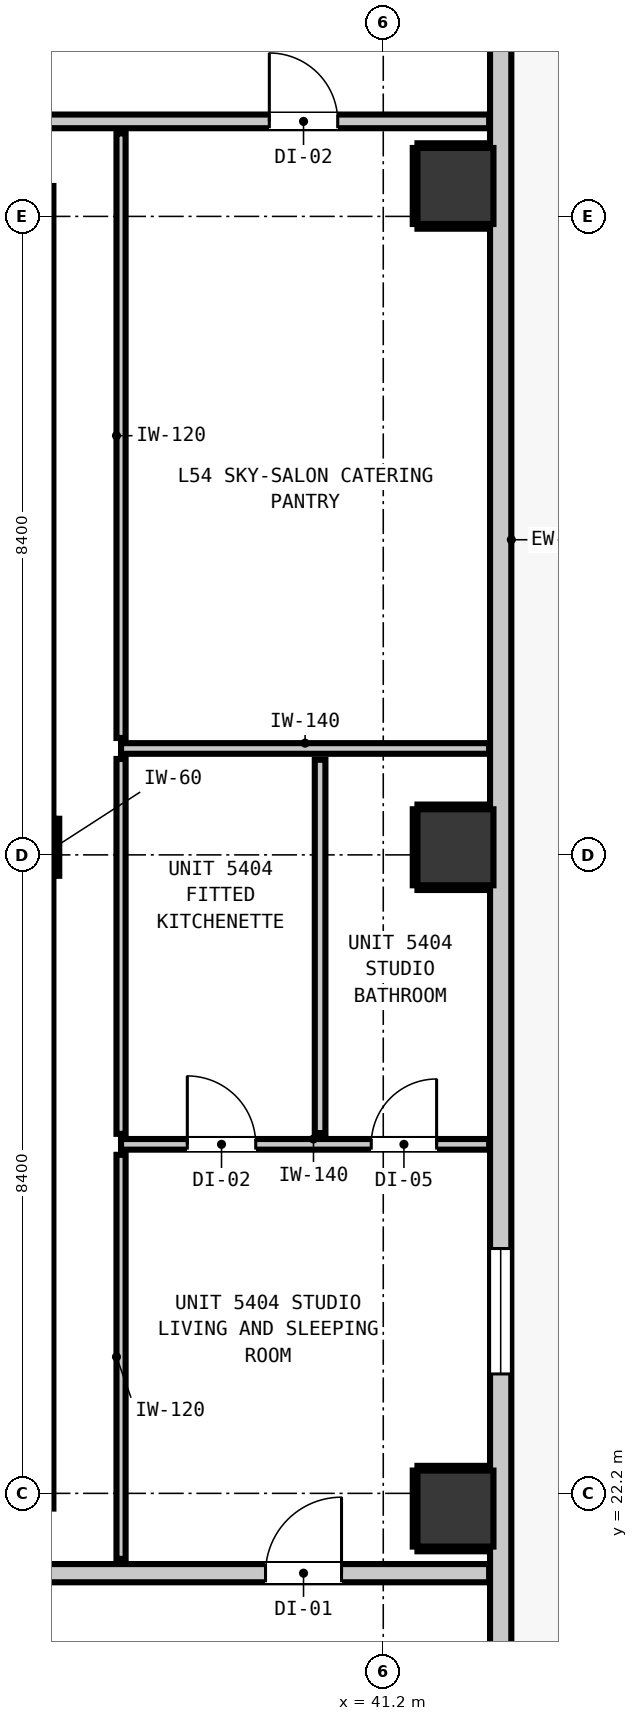
"""IFC4 building model, lengths in metres.
Left out: names, types, materials, properties, quantities, classifications, styles, units other than length and angle.
Written with IfcOpenShell. Run it as: python <this file> out.ifc"""

import sys

from ifc_helpers import new_model, si_unit, direction, frame, frame_2d, origin, origin_2d, place, context, subcontext, project, spatial, rectangle, extrude, element, fill, save


model = new_model("IFC4")
c1 = context("Model", 3, precision=1e-05, world=origin(), true_north=direction((0.0, 1.0)))
c2 = subcontext(c1, "Body", "Model", "MODEL_VIEW")
j1 = project(units=[si_unit("LENGTHUNIT", "METRE"), si_unit("PLANEANGLEUNIT", "RADIAN")], contexts=[c1])
p1 = place(None, origin())
s1 = spatial("IfcSite", under=j1, at=p1, CompositionType="ELEMENT")
p2 = place(p1, origin())
s2 = spatial("IfcBuilding", under=s1, at=p2, CompositionType="ELEMENT")
p3 = place(p2, frame((0.0, 0.0, 186.84)))
s3 = spatial("IfcBuildingStorey", under=s2, at=p3, CompositionType="ELEMENT", Elevation=186.84)
p4 = place(p3, frame((36.5, 30.7, 0.0), z_axis=(0.0, 0.0, 1.0), x_axis=(1.0, 0.0, 0.0)))
e1 = element("IfcColumn", 1, at=p4, inside=s3, PredefinedType="COLUMN", context=c2, shape_type="SweptSolid", body=[
    extrude(rectangle(XDim=0.75, YDim=0.75, at=origin_2d()), origin(), (0.0, 0.0, 1.0), 3.32),
])
p5 = place(p3, frame((36.46, 22.0, 0.0), z_axis=(0.0, 0.0, 1.0), x_axis=(0.0, 1.0, 0.0)))
e2 = element("IfcWall", 2, at=p5, inside=s3, PredefinedType="SHEAR", context=c2, shape_type="SweptSolid", body=[
    extrude(rectangle(XDim=8.32, YDim=0.8, at=frame_2d((4.16, 0.0))), origin(), (0.0, 0.0, 1.0), 3.32),
])
p6 = place(p3, frame((36.46, 31.08, 0.0), z_axis=(0.0, 0.0, 1.0), x_axis=(0.0, 1.0, 0.0)))
e3 = element("IfcWall", 3, at=p6, inside=s3, PredefinedType="SHEAR", context=c2, shape_type="SweptSolid", body=[
    extrude(rectangle(XDim=8.32, YDim=0.8, at=frame_2d((4.16, 0.0))), origin(), (0.0, 0.0, 1.0), 3.32),
])
for number, where, z_axis, x_axis in (
    (4, (42.15, 22.0, 0.0), (0.0, 0.0, 1.0), (1.0, 0.0, 0.0)),
    (5, (42.15, 30.7, 0.0), (0.0, 0.0, 1.0), (1.0, 0.0, 0.0)),
    (6, (42.15, 39.4, 0.0), (0.0, 0.0, 1.0), (1.0, 0.0, 0.0)),
):
    element("IfcColumn", number, at=place(p3, frame(where, z_axis=z_axis, x_axis=x_axis)), inside=s3, PredefinedType="COLUMN", context=c2, shape_type="SweptSolid", body=[
        extrude(rectangle(XDim=1.0, YDim=1.0, at=origin_2d()), origin(), (0.0, 0.0, 1.0), 2.9),
    ])
p7 = place(p3, frame((42.745, 49.845, 0.0), z_axis=(0.0, 0.0, 1.0), x_axis=(0.0, -1.0, 0.0)))
e7 = element("IfcWall", 7, at=p7, inside=s3, PredefinedType="STANDARD", context=c2, shape_type="SweptSolid", body=[
    extrude(rectangle(XDim=32.29, YDim=0.28, at=frame_2d((16.145, 0.0))), origin(), (0.0, 0.0, 1.0), 2.9),
])
p8 = place(p7, frame((0.904, 0.0, 0.0)))
e8 = element("IfcOpeningElement", 8, at=p8, cuts=e7, PredefinedType="OPENING", context=c2, shape_type="SweptSolid", body=[
    extrude(rectangle(XDim=1.0, YDim=2.15, at=frame_2d((0.5, 1.075))), frame((0.0, 0.15, 0.0), z_axis=(0.0, -1.0, 0.0), x_axis=(1.0, 0.0, 0.0)), (0.0, 0.0, 1.0), 0.3),
])
p9 = place(p7, frame((30.822, 0.0, 0.85)))
e9 = element("IfcOpeningElement", 9, at=p9, cuts=e7, PredefinedType="OPENING", context=c2, shape_type="SweptSolid", body=[
    extrude(rectangle(XDim=1.05, YDim=1.65, at=frame_2d((0.525, 0.825))), frame((0.0, 0.15, 0.0), z_axis=(0.0, -1.0, 0.0), x_axis=(1.0, 0.0, 0.0)), (0.0, 0.0, 1.0), 0.3),
])
p10 = place(p7, frame((4.124, 0.0, 0.85)))
e10 = element("IfcOpeningElement", 10, at=p10, cuts=e7, PredefinedType="OPENING", context=c2, shape_type="SweptSolid", body=[
    extrude(rectangle(XDim=1.65, YDim=1.75, at=frame_2d((0.825, 0.875))), frame((0.0, 0.15, 0.0), z_axis=(0.0, -1.0, 0.0), x_axis=(1.0, 0.0, 0.0)), (0.0, 0.0, 1.0), 0.3),
])
p11 = place(p7, frame((24.424, 0.0, 0.85)))
e11 = element("IfcOpeningElement", 11, at=p11, cuts=e7, PredefinedType="OPENING", context=c2, shape_type="SweptSolid", body=[
    extrude(rectangle(XDim=1.65, YDim=1.75, at=frame_2d((0.825, 0.875))), frame((0.0, 0.15, 0.0), z_axis=(0.0, -1.0, 0.0), x_axis=(1.0, 0.0, 0.0)), (0.0, 0.0, 1.0), 0.3),
])
p12 = place(p3, frame((3.207, 21.15, 0.0), z_axis=(0.0, 0.0, 1.0), x_axis=(1.0, 0.0, 0.0)))
e12 = element("IfcWall", 12, at=p12, inside=s3, PredefinedType="PARTITIONING", context=c2, shape_type="SweptSolid", body=[
    extrude(rectangle(XDim=39.386, YDim=0.24, at=frame_2d((19.693, 0.0))), origin(), (0.0, 0.0, 1.0), 2.9),
])
p13 = place(p12, frame((15.003, 0.0, 0.0)))
e13 = element("IfcOpeningElement", 13, at=p13, cuts=e12, PredefinedType="OPENING", context=c2, shape_type="SweptSolid", body=[
    extrude(rectangle(XDim=1.1, YDim=2.15, at=frame_2d((0.55, 1.075))), frame((0.0, 0.13, 0.0), z_axis=(0.0, -1.0, 0.0), x_axis=(1.0, 0.0, 0.0)), (0.0, 0.0, 1.0), 0.26),
])
p14 = place(p12, frame((4.042, 0.0, 0.0)))
e14 = element("IfcOpeningElement", 14, at=p14, cuts=e12, PredefinedType="OPENING", context=c2, shape_type="SweptSolid", body=[
    extrude(rectangle(XDim=0.9, YDim=2.1, at=frame_2d((0.45, 1.05))), frame((0.0, 0.13, 0.0), z_axis=(0.0, -1.0, 0.0), x_axis=(1.0, 0.0, 0.0)), (0.0, 0.0, 1.0), 0.26),
])
p15 = place(p12, frame((36.444, 0.0, 0.0)))
e15 = element("IfcOpeningElement", 15, at=p15, cuts=e12, PredefinedType="OPENING", context=c2, shape_type="SweptSolid", body=[
    extrude(rectangle(XDim=1.0, YDim=2.15, at=frame_2d((0.5, 1.075))), frame((0.0, 0.13, 0.0), z_axis=(0.0, -1.0, 0.0), x_axis=(1.0, 0.0, 0.0)), (0.0, 0.0, 1.0), 0.26),
])
p16 = place(p3, frame((3.207, 40.25, 0.0), z_axis=(0.0, 0.0, 1.0), x_axis=(1.0, 0.0, 0.0)))
e16 = element("IfcWall", 16, at=p16, inside=s3, PredefinedType="PARTITIONING", context=c2, shape_type="SweptSolid", body=[
    extrude(rectangle(XDim=39.386, YDim=0.18, at=frame_2d((19.693, 0.0))), origin(), (0.0, 0.0, 1.0), 2.9),
])
p17 = place(p16, frame((14.228, 0.0, 0.0)))
e17 = element("IfcOpeningElement", 17, at=p17, cuts=e16, PredefinedType="OPENING", context=c2, shape_type="SweptSolid", body=[
    extrude(rectangle(XDim=1.4, YDim=2.15, at=frame_2d((0.7, 1.075))), frame((0.0, 0.1, 0.0), z_axis=(0.0, -1.0, 0.0), x_axis=(1.0, 0.0, 0.0)), (0.0, 0.0, 1.0), 0.2),
])
p18 = place(p16, frame((1.267, 0.0, 0.0)))
e18 = element("IfcOpeningElement", 18, at=p18, cuts=e16, PredefinedType="OPENING", context=c2, shape_type="SweptSolid", body=[
    extrude(rectangle(XDim=0.9, YDim=2.1, at=frame_2d((0.45, 1.05))), frame((0.0, 0.1, 0.0), z_axis=(0.0, -1.0, 0.0), x_axis=(1.0, 0.0, 0.0)), (0.0, 0.0, 1.0), 0.2),
])
p19 = place(p16, frame((5.694, 0.0, 0.0)))
e19 = element("IfcOpeningElement", 19, at=p19, cuts=e16, PredefinedType="OPENING", context=c2, shape_type="SweptSolid", body=[
    extrude(rectangle(XDim=0.95, YDim=2.1, at=frame_2d((0.475, 1.05))), frame((0.0, 0.1, 0.0), z_axis=(0.0, -1.0, 0.0), x_axis=(1.0, 0.0, 0.0)), (0.0, 0.0, 1.0), 0.2),
])
p20 = place(p16, frame((36.494, 0.0, 0.0)))
e20 = element("IfcOpeningElement", 20, at=p20, cuts=e16, PredefinedType="OPENING", context=c2, shape_type="SweptSolid", body=[
    extrude(rectangle(XDim=0.9, YDim=2.1, at=frame_2d((0.45, 1.05))), frame((0.0, 0.1, 0.0), z_axis=(0.0, -1.0, 0.0), x_axis=(1.0, 0.0, 0.0)), (0.0, 0.0, 1.0), 0.2),
])
p21 = place(p3, frame((37.75, 26.792, 0.0), z_axis=(0.0, 0.0, 1.0), x_axis=(1.0, 0.0, 0.0)))
e21 = element("IfcWall", 21, at=p21, inside=s3, PredefinedType="PARTITIONING", context=c2, shape_type="SweptSolid", body=[
    extrude(rectangle(XDim=4.843, YDim=0.14, at=frame_2d((2.421, 0.0))), origin(), (0.0, 0.0, 1.0), 2.9),
])
p22 = place(p21, frame((0.872, 0.0, 0.0)))
e22 = element("IfcOpeningElement", 22, at=p22, cuts=e21, PredefinedType="OPENING", context=c2, shape_type="SweptSolid", body=[
    extrude(rectangle(XDim=0.9, YDim=2.1, at=frame_2d((0.45, 1.05))), frame((0.0, 0.08, 0.0), z_axis=(0.0, -1.0, 0.0), x_axis=(1.0, 0.0, 0.0)), (0.0, 0.0, 1.0), 0.16),
])
p23 = place(p21, frame((3.292, 0.0, 0.0)))
e23 = element("IfcOpeningElement", 23, at=p23, cuts=e21, PredefinedType="OPENING", context=c2, shape_type="SweptSolid", body=[
    extrude(rectangle(XDim=0.86, YDim=2.02, at=frame_2d((0.43, 1.01))), frame((0.0, 0.08, 0.0), z_axis=(0.0, -1.0, 0.0), x_axis=(1.0, 0.0, 0.0)), (0.0, 0.0, 1.0), 0.16),
])
p24 = place(p3, frame((37.75, 32.0, 0.0), z_axis=(0.0, 0.0, 1.0), x_axis=(1.0, 0.0, 0.0)))
e24 = element("IfcWall", 24, at=p24, inside=s3, PredefinedType="PARTITIONING", context=c2, shape_type="SweptSolid", body=[
    extrude(rectangle(XDim=4.843, YDim=0.14, at=frame_2d((2.421, 0.0))), origin(), (0.0, 0.0, 1.0), 2.9),
])
p25 = place(p3, frame((40.369, 26.94, 0.0), z_axis=(0.0, 0.0, 1.0), x_axis=(0.0, 1.0, 0.0)))
e25 = element("IfcWall", 25, at=p25, inside=s3, PredefinedType="PARTITIONING", context=c2, shape_type="SweptSolid", body=[
    extrude(rectangle(XDim=4.912, YDim=0.14, at=frame_2d((2.456, 0.0))), origin(), (0.0, 0.0, 1.0), 2.9),
])
p26 = place(p3, frame((37.75, 21.338, 0.0), z_axis=(0.0, 0.0, 1.0), x_axis=(0.0, 1.0, 0.0)))
e26 = element("IfcWall", 26, at=p26, inside=s3, PredefinedType="PARTITIONING", context=c2, shape_type="SweptSolid", body=[
    extrude(rectangle(XDim=5.316, YDim=0.12, at=frame_2d((2.658, 0.0))), origin(), (0.0, 0.0, 1.0), 2.9),
])
p27 = place(p3, frame((37.75, 26.93, 0.0), z_axis=(0.0, 0.0, 1.0), x_axis=(0.0, 1.0, 0.0)))
e27 = element("IfcWall", 27, at=p27, inside=s3, PredefinedType="PARTITIONING", context=c2, shape_type="SweptSolid", body=[
    extrude(rectangle(XDim=4.932, YDim=0.12, at=frame_2d((2.466, 0.0))), origin(), (0.0, 0.0, 1.0), 2.9),
])
p28 = place(p3, frame((37.75, 32.138, 0.0), z_axis=(0.0, 0.0, 1.0), x_axis=(0.0, 1.0, 0.0)))
e28 = element("IfcWall", 28, at=p28, inside=s3, PredefinedType="PARTITIONING", context=c2, shape_type="SweptSolid", body=[
    extrude(rectangle(XDim=7.954, YDim=0.12, at=frame_2d((3.977, 0.0))), origin(), (0.0, 0.0, 1.0), 2.9),
])
p29 = place(p3, frame((36.907, 30.325, 0.0), z_axis=(0.0, 0.0, 1.0), x_axis=(0.0, 1.0, 0.0)))
e29 = element("IfcWall", 29, at=p29, inside=s3, PredefinedType="PARTITIONING", context=c2, shape_type="SweptSolid", body=[
    extrude(rectangle(XDim=0.75, YDim=0.06, at=frame_2d((0.375, 0.0))), origin(), (0.0, 0.0, 1.0), 0.905),
])
for number, where, z_axis, x_axis in (
    (30, (41.65, 21.468, 0.0), (0.0, 0.0, 1.0), (1.0, 0.0, 0.0)),
    (31, (41.65, 22.532, 0.0), (0.0, 0.0, 1.0), (1.0, 0.0, 0.0)),
):
    element("IfcWall", number, at=place(p3, frame(where, z_axis=z_axis, x_axis=x_axis)), inside=s3, PredefinedType="PARTITIONING", context=c2, shape_type="SweptSolid", body=[
        extrude(rectangle(XDim=0.94, YDim=0.06, at=frame_2d((0.47, 0.0))), origin(), (0.0, 0.0, 1.0), 0.905),
    ])
p30 = place(p3, frame((41.618, 21.5, 0.0), z_axis=(0.0, 0.0, 1.0), x_axis=(0.0, 1.0, 0.0)))
e32 = element("IfcWall", 32, at=p30, inside=s3, PredefinedType="PARTITIONING", context=c2, shape_type="SweptSolid", body=[
    extrude(rectangle(XDim=1.0, YDim=0.06, at=frame_2d((0.5, 0.0))), origin(), (0.0, 0.0, 1.0), 1.45),
])
for number, where, z_axis, x_axis in (
    (33, (41.65, 30.168, 0.0), (0.0, 0.0, 1.0), (1.0, 0.0, 0.0)),
    (34, (41.65, 31.232, 0.0), (0.0, 0.0, 1.0), (1.0, 0.0, 0.0)),
):
    element("IfcWall", number, at=place(p3, frame(where, z_axis=z_axis, x_axis=x_axis)), inside=s3, PredefinedType="PARTITIONING", context=c2, shape_type="SweptSolid", body=[
        extrude(rectangle(XDim=0.94, YDim=0.06, at=frame_2d((0.47, 0.0))), origin(), (0.0, 0.0, 1.0), 0.905),
    ])
p31 = place(p3, frame((41.618, 30.2, 0.0), z_axis=(0.0, 0.0, 1.0), x_axis=(0.0, 1.0, 0.0)))
e35 = element("IfcWall", 35, at=p31, inside=s3, PredefinedType="PARTITIONING", context=c2, shape_type="SweptSolid", body=[
    extrude(rectangle(XDim=1.0, YDim=0.06, at=frame_2d((0.5, 0.0))), origin(), (0.0, 0.0, 1.0), 1.45),
])
for number, where, z_axis, x_axis in (
    (36, (41.65, 38.868, 0.0), (0.0, 0.0, 1.0), (1.0, 0.0, 0.0)),
    (37, (41.65, 39.932, 0.0), (0.0, 0.0, 1.0), (1.0, 0.0, 0.0)),
):
    element("IfcWall", number, at=place(p3, frame(where, z_axis=z_axis, x_axis=x_axis)), inside=s3, PredefinedType="PARTITIONING", context=c2, shape_type="SweptSolid", body=[
        extrude(rectangle(XDim=0.94, YDim=0.06, at=frame_2d((0.47, 0.0))), origin(), (0.0, 0.0, 1.0), 0.905),
    ])
p32 = place(p3, frame((41.618, 38.9, 0.0), z_axis=(0.0, 0.0, 1.0), x_axis=(0.0, 1.0, 0.0)))
e38 = element("IfcWall", 38, at=p32, inside=s3, PredefinedType="PARTITIONING", context=c2, shape_type="SweptSolid", body=[
    extrude(rectangle(XDim=1.0, YDim=0.06, at=frame_2d((0.5, 0.0))), origin(), (0.0, 0.0, 1.0), 1.45),
])
p33 = place(p11, origin())
e39 = element("IfcWindow", 39, at=p33, inside=s3, PartitioningType="SINGLE_PANEL", PredefinedType="WINDOW", context=c2, shape_type="SweptSolid", body=[
    extrude(rectangle(XDim=1.65, YDim=1.75, at=frame_2d((0.825, 0.875))), frame((0.0, 0.03, 0.0), z_axis=(0.0, -1.0, 0.0), x_axis=(1.0, 0.0, 0.0)), (0.0, 0.0, 1.0), 0.06),
])
fill(e11, e39)
p34 = place(p15, origin())
e40 = element("IfcDoor", 40, at=p34, inside=s3, OperationType="SINGLE_SWING_RIGHT", PredefinedType="DOOR", context=c2, shape_type="SweptSolid", body=[
    extrude(rectangle(XDim=1.0, YDim=2.15, at=frame_2d((0.5, 1.075))), frame((0.0, 0.025, 0.0), z_axis=(0.0, -1.0, 0.0), x_axis=(1.0, 0.0, 0.0)), (0.0, 0.0, 1.0), 0.05),
])
fill(e15, e40)
p35 = place(p22, origin())
e41 = element("IfcDoor", 41, at=p35, inside=s3, OperationType="SINGLE_SWING_LEFT", PredefinedType="DOOR", context=c2, shape_type="SweptSolid", body=[
    extrude(rectangle(XDim=0.9, YDim=2.1, at=frame_2d((0.45, 1.05))), frame((0.0, 0.025, 0.0), z_axis=(0.0, -1.0, 0.0), x_axis=(1.0, 0.0, 0.0)), (0.0, 0.0, 1.0), 0.05),
])
fill(e22, e41)
p36 = place(p23, origin())
e42 = element("IfcDoor", 42, at=p36, inside=s3, OperationType="SINGLE_SWING_RIGHT", PredefinedType="DOOR", context=c2, shape_type="SweptSolid", body=[
    extrude(rectangle(XDim=0.86, YDim=2.02, at=frame_2d((0.43, 1.01))), frame((0.0, 0.025, 0.0), z_axis=(0.0, -1.0, 0.0), x_axis=(1.0, 0.0, 0.0)), (0.0, 0.0, 1.0), 0.05),
])
fill(e23, e42)
p37 = place(p20, origin())
e43 = element("IfcDoor", 43, at=p37, inside=s3, OperationType="SINGLE_SWING_LEFT", PredefinedType="DOOR", context=c2, shape_type="SweptSolid", body=[
    extrude(rectangle(XDim=0.9, YDim=2.1, at=frame_2d((0.45, 1.05))), frame((0.0, 0.025, 0.0), z_axis=(0.0, -1.0, 0.0), x_axis=(1.0, 0.0, 0.0)), (0.0, 0.0, 1.0), 0.05),
])
fill(e20, e43)
save(model, sys.argv[1])
